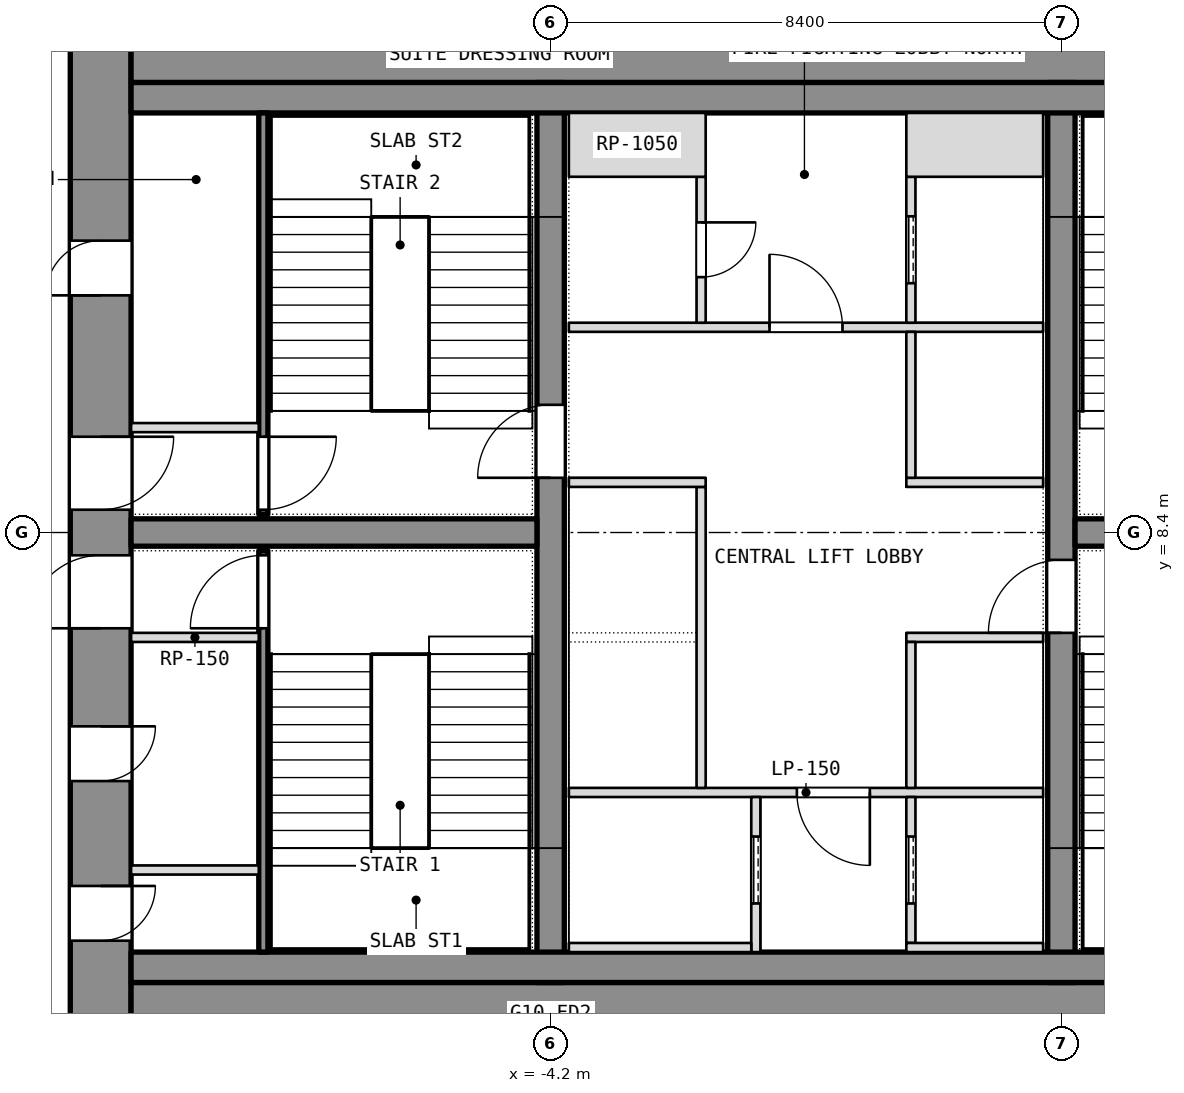
"""IFC4 building model, lengths in metres.
Left out: names, types, materials, properties, quantities, classifications, styles, units other than length and angle.
Written with IfcOpenShell. Run it as: python <this file> out.ifc"""

import sys

from ifc_helpers import new_model, si_unit, direction, frame, frame_2d, origin, place, context, subcontext, project, spatial, rectangle, extrude, element, fill, save


model = new_model("IFC4")
c1 = context("Model", 3, precision=1e-05, world=origin(), true_north=direction((0.0, 1.0)))
c2 = subcontext(c1, "Body", "Model", "MODEL_VIEW")
j1 = project(units=[si_unit("LENGTHUNIT", "METRE"), si_unit("PLANEANGLEUNIT", "RADIAN")], contexts=[c1])
p1 = place(None, origin())
s1 = spatial("IfcSite", under=j1, at=p1, CompositionType="ELEMENT")
p2 = place(p1, origin())
s2 = spatial("IfcBuilding", under=s1, at=p2, CompositionType="ELEMENT")
p3 = place(p2, frame((0.0, 0.0, 126.5)))
s3 = spatial("IfcBuildingStorey", under=s2, at=p3, CompositionType="ELEMENT", Elevation=126.5)
p4 = place(p3, frame((-11.6, 0.0, 0.0), z_axis=(0.0, 0.0, 1.0), x_axis=(0.0, 1.0, 0.0)))
e1 = element("IfcWall", 1, at=p4, inside=s3, PredefinedType="SHEAR", context=c2, shape_type="SweptSolid", body=[
    extrude(rectangle(XDim=16.8, YDim=1.0, at=frame_2d((8.4, 0.0))), origin(), (0.0, 0.0, 1.0), 3.6),
])
p5 = place(p4, frame((1.688, 0.0, 0.0)))
e2 = element("IfcOpeningElement", 2, at=p5, cuts=e1, PredefinedType="OPENING", context=c2, shape_type="SweptSolid", body=[
    extrude(rectangle(XDim=0.9, YDim=2.1, at=frame_2d((0.45, 1.05))), frame((0.0, 0.5, 0.0), z_axis=(0.0, -1.0, 0.0), x_axis=(1.0, 0.0, 0.0)), (0.0, 0.0, 1.0), 1.0),
])
p6 = place(p4, frame((4.312, 0.0, 0.0)))
e3 = element("IfcOpeningElement", 3, at=p6, cuts=e1, PredefinedType="OPENING", context=c2, shape_type="SweptSolid", body=[
    extrude(rectangle(XDim=0.9, YDim=2.1, at=frame_2d((0.45, 1.05))), frame((0.0, 0.5, 0.0), z_axis=(0.0, -1.0, 0.0), x_axis=(1.0, 0.0, 0.0)), (0.0, 0.0, 1.0), 1.0),
])
p7 = place(p4, frame((6.825, 0.0, 0.0)))
e4 = element("IfcOpeningElement", 4, at=p7, cuts=e1, PredefinedType="OPENING", context=c2, shape_type="SweptSolid", body=[
    extrude(rectangle(XDim=1.2, YDim=2.1, at=frame_2d((0.6, 1.05))), frame((0.0, 0.5, 0.0), z_axis=(0.0, -1.0, 0.0), x_axis=(1.0, 0.0, 0.0)), (0.0, 0.0, 1.0), 1.0),
])
p8 = place(p4, frame((12.3, 0.0, 0.0)))
e5 = element("IfcOpeningElement", 5, at=p8, cuts=e1, PredefinedType="OPENING", context=c2, shape_type="SweptSolid", body=[
    extrude(rectangle(XDim=0.9, YDim=2.1, at=frame_2d((0.45, 1.05))), frame((0.0, 0.5, 0.0), z_axis=(0.0, -1.0, 0.0), x_axis=(1.0, 0.0, 0.0)), (0.0, 0.0, 1.0), 1.0),
])
p9 = place(p4, frame((8.775, 0.0, 0.0)))
e6 = element("IfcOpeningElement", 6, at=p9, cuts=e1, PredefinedType="OPENING", context=c2, shape_type="SweptSolid", body=[
    extrude(rectangle(XDim=1.2, YDim=2.1, at=frame_2d((0.6, 1.05))), frame((0.0, 0.5, 0.0), z_axis=(0.0, -1.0, 0.0), x_axis=(1.0, 0.0, 0.0)), (0.0, 0.0, 1.0), 1.0),
])
for number, where, z_axis, x_axis in (
    (7, (-11.1, 0.5, 0.0), (0.0, 0.0, 1.0), (1.0, 0.0, 0.0)),
    (8, (-11.1, 16.3, 0.0), (0.0, 0.0, 1.0), (1.0, 0.0, 0.0)),
):
    element("IfcWall", number, at=place(p3, frame(where, z_axis=z_axis, x_axis=x_axis)), inside=s3, PredefinedType="SHEAR", context=c2, shape_type="SweptSolid", body=[
        extrude(rectangle(XDim=22.2, YDim=1.0, at=frame_2d((11.1, 0.0))), origin(), (0.0, 0.0, 1.0), 3.6),
    ])
p10 = place(p3, frame((-4.2, 1.0, 0.0), z_axis=(0.0, 0.0, 1.0), x_axis=(0.0, 1.0, 0.0)))
e9 = element("IfcWall", 9, at=p10, inside=s3, PredefinedType="SHEAR", context=c2, shape_type="SweptSolid", body=[
    extrude(rectangle(XDim=14.8, YDim=0.45, at=frame_2d((7.4, 0.0))), origin(), (0.0, 0.0, 1.0), 3.6),
])
p11 = place(p10, frame((8.3, 0.0, 0.0)))
e10 = element("IfcOpeningElement", 10, at=p11, cuts=e9, PredefinedType="OPENING", context=c2, shape_type="SweptSolid", body=[
    extrude(rectangle(XDim=1.2, YDim=2.1, at=frame_2d((0.6, 1.05))), frame((0.0, 0.225, 0.0), z_axis=(0.0, -1.0, 0.0), x_axis=(1.0, 0.0, 0.0)), (0.0, 0.0, 1.0), 0.45),
])
p12 = place(p3, frame((4.2, 1.0, 0.0), z_axis=(0.0, 0.0, 1.0), x_axis=(0.0, 1.0, 0.0)))
e11 = element("IfcWall", 11, at=p12, inside=s3, PredefinedType="SHEAR", context=c2, shape_type="SweptSolid", body=[
    extrude(rectangle(XDim=14.8, YDim=0.45, at=frame_2d((7.4, 0.0))), origin(), (0.0, 0.0, 1.0), 3.6),
])
p13 = place(p12, frame((5.75, 0.0, 0.0)))
e12 = element("IfcOpeningElement", 12, at=p13, cuts=e11, PredefinedType="OPENING", context=c2, shape_type="SweptSolid", body=[
    extrude(rectangle(XDim=1.2, YDim=2.1, at=frame_2d((0.6, 1.05))), frame((0.0, 0.225, 0.0), z_axis=(0.0, -1.0, 0.0), x_axis=(1.0, 0.0, 0.0)), (0.0, 0.0, 1.0), 0.45),
])
for number, where, z_axis, x_axis in (
    (13, (-11.1, 8.4, 0.0), (0.0, 0.0, 1.0), (1.0, 0.0, 0.0)),
    (14, (4.425, 8.4, 0.0), (0.0, 0.0, 1.0), (1.0, 0.0, 0.0)),
):
    element("IfcWall", number, at=place(p3, frame(where, z_axis=z_axis, x_axis=x_axis)), inside=s3, PredefinedType="SHEAR", context=c2, shape_type="SweptSolid", body=[
        extrude(rectangle(XDim=6.675, YDim=0.45, at=frame_2d((3.337, 0.0))), origin(), (0.0, 0.0, 1.0), 3.6),
    ])
for number, where, z_axis, x_axis in (
    (15, (-11.1, 1.25, 0.0), (0.0, 0.0, 1.0), (1.0, 0.0, 0.0)),
    (16, (-11.1, 15.55, 0.0), (0.0, 0.0, 1.0), (1.0, 0.0, 0.0)),
):
    element("IfcWall", number, at=place(p3, frame(where, z_axis=z_axis, x_axis=x_axis)), inside=s3, PredefinedType="PARTITIONING", context=c2, shape_type="SweptSolid", body=[
        extrude(rectangle(XDim=22.2, YDim=0.5, at=frame_2d((11.1, 0.0))), origin(), (0.0, 0.0, 1.0), 3.34),
    ])
p14 = place(p3, frame((-8.925, 1.5, 0.0), z_axis=(0.0, 0.0, 1.0), x_axis=(0.0, 1.0, 0.0)))
e17 = element("IfcWall", 17, at=p14, inside=s3, PredefinedType="SHEAR", context=c2, shape_type="SweptSolid", body=[
    extrude(rectangle(XDim=6.6, YDim=0.15, at=frame_2d((3.3, 0.0))), origin(), (0.0, 0.0, 1.0), 3.34),
])
p15 = place(p14, frame((5.325, 0.0, 0.0)))
e18 = element("IfcOpeningElement", 18, at=p15, cuts=e17, PredefinedType="OPENING", context=c2, shape_type="SweptSolid", body=[
    extrude(rectangle(XDim=1.2, YDim=2.1, at=frame_2d((0.6, 1.05))), frame((0.0, 0.075, 0.0), z_axis=(0.0, -1.0, 0.0), x_axis=(1.0, 0.0, 0.0)), (0.0, 0.0, 1.0), 0.15),
])
for number, where, z_axis, x_axis in (
    (19, (-11.1, 6.675, 0.0), (0.0, 0.0, 1.0), (1.0, 0.0, 0.0)),
    (20, (-11.1, 2.85, 0.0), (0.0, 0.0, 1.0), (1.0, 0.0, 0.0)),
):
    element("IfcWall", number, at=place(p3, frame(where, z_axis=z_axis, x_axis=x_axis)), inside=s3, PredefinedType="PARTITIONING", context=c2, shape_type="SweptSolid", body=[
        extrude(rectangle(XDim=2.1, YDim=0.15, at=frame_2d((1.05, 0.0))), origin(), (0.0, 0.0, 1.0), 3.34),
    ])
p16 = place(p3, frame((-8.925, 8.7, 0.0), z_axis=(0.0, 0.0, 1.0), x_axis=(0.0, 1.0, 0.0)))
e21 = element("IfcWall", 21, at=p16, inside=s3, PredefinedType="SHEAR", context=c2, shape_type="SweptSolid", body=[
    extrude(rectangle(XDim=6.6, YDim=0.15, at=frame_2d((3.3, 0.0))), origin(), (0.0, 0.0, 1.0), 3.34),
])
p17 = place(p16, frame((0.075, 0.0, 0.0)))
e22 = element("IfcOpeningElement", 22, at=p17, cuts=e21, PredefinedType="OPENING", context=c2, shape_type="SweptSolid", body=[
    extrude(rectangle(XDim=1.2, YDim=2.1, at=frame_2d((0.6, 1.05))), frame((0.0, 0.075, 0.0), z_axis=(0.0, -1.0, 0.0), x_axis=(1.0, 0.0, 0.0)), (0.0, 0.0, 1.0), 0.15),
])
p18 = place(p3, frame((-11.1, 10.125, 0.0), z_axis=(0.0, 0.0, 1.0), x_axis=(1.0, 0.0, 0.0)))
e23 = element("IfcWall", 23, at=p18, inside=s3, PredefinedType="PARTITIONING", context=c2, shape_type="SweptSolid", body=[
    extrude(rectangle(XDim=2.1, YDim=0.15, at=frame_2d((1.05, 0.0))), origin(), (0.0, 0.0, 1.0), 3.34),
])
p19 = place(p3, frame((-3.9, 4.125, 0.0), z_axis=(0.0, 0.0, 1.0), x_axis=(1.0, 0.0, 0.0)))
e24 = element("IfcWall", 24, at=p19, inside=s3, PredefinedType="PARTITIONING", context=c2, shape_type="SweptSolid", body=[
    extrude(rectangle(XDim=7.8, YDim=0.15, at=frame_2d((3.9, 0.0))), origin(), (0.0, 0.0, 1.0), 3.34),
])
p20 = place(p19, frame((3.75, 0.0, 0.0)))
e25 = element("IfcOpeningElement", 25, at=p20, cuts=e24, PredefinedType="OPENING", context=c2, shape_type="SweptSolid", body=[
    extrude(rectangle(XDim=1.2, YDim=2.1, at=frame_2d((0.6, 1.05))), frame((0.0, 0.075, 0.0), z_axis=(0.0, -1.0, 0.0), x_axis=(1.0, 0.0, 0.0)), (0.0, 0.0, 1.0), 0.15),
])
p21 = place(p3, frame((-3.9, 11.775, 0.0), z_axis=(0.0, 0.0, 1.0), x_axis=(1.0, 0.0, 0.0)))
e26 = element("IfcWall", 26, at=p21, inside=s3, PredefinedType="PARTITIONING", context=c2, shape_type="SweptSolid", body=[
    extrude(rectangle(XDim=7.8, YDim=0.15, at=frame_2d((3.9, 0.0))), origin(), (0.0, 0.0, 1.0), 3.34),
])
p22 = place(p21, frame((3.3, 0.0, 0.0)))
e27 = element("IfcOpeningElement", 27, at=p22, cuts=e26, PredefinedType="OPENING", context=c2, shape_type="SweptSolid", body=[
    extrude(rectangle(XDim=1.2, YDim=2.1, at=frame_2d((0.6, 1.05))), frame((0.0, 0.075, 0.0), z_axis=(0.0, -1.0, 0.0), x_axis=(1.0, 0.0, 0.0)), (0.0, 0.0, 1.0), 0.15),
])
p23 = place(p3, frame((-0.825, 1.5, 0.0), z_axis=(0.0, 0.0, 1.0), x_axis=(0.0, 1.0, 0.0)))
e28 = element("IfcWall", 28, at=p23, inside=s3, PredefinedType="SHEAR", context=c2, shape_type="SweptSolid", body=[
    extrude(rectangle(XDim=2.55, YDim=0.15, at=frame_2d((1.275, 0.0))), origin(), (0.0, 0.0, 1.0), 3.6),
])
p24 = place(p23, frame((0.8, 0.0, 0.0)))
e29 = element("IfcOpeningElement", 29, at=p24, cuts=e28, PredefinedType="OPENING", context=c2, shape_type="SweptSolid", body=[
    extrude(rectangle(XDim=1.1, YDim=2.1, at=frame_2d((0.55, 1.05))), frame((0.0, 0.075, 0.0), z_axis=(0.0, -1.0, 0.0), x_axis=(1.0, 0.0, 0.0)), (0.0, 0.0, 1.0), 0.15),
])
p25 = place(p3, frame((-3.9, 1.575, 0.0), z_axis=(0.0, 0.0, 1.0), x_axis=(1.0, 0.0, 0.0)))
e30 = element("IfcWall", 30, at=p25, inside=s3, PredefinedType="SHEAR", context=c2, shape_type="SweptSolid", body=[
    extrude(rectangle(XDim=3.0, YDim=0.15, at=frame_2d((1.5, 0.0))), origin(), (0.0, 0.0, 1.0), 3.6),
])
p26 = place(p3, frame((-1.725, 4.2, 0.0), z_axis=(0.0, 0.0, 1.0), x_axis=(0.0, 1.0, 0.0)))
e31 = element("IfcWall", 31, at=p26, inside=s3, PredefinedType="SHEAR", context=c2, shape_type="SweptSolid", body=[
    extrude(rectangle(XDim=4.95, YDim=0.15, at=frame_2d((2.475, 0.0))), origin(), (0.0, 0.0, 1.0), 3.6),
])
p27 = place(p3, frame((-3.9, 9.225, 0.0), z_axis=(0.0, 0.0, 1.0), x_axis=(1.0, 0.0, 0.0)))
e32 = element("IfcWall", 32, at=p27, inside=s3, PredefinedType="SHEAR", context=c2, shape_type="SweptSolid", body=[
    extrude(rectangle(XDim=2.25, YDim=0.15, at=frame_2d((1.125, 0.0))), origin(), (0.0, 0.0, 1.0), 3.6),
])
p28 = place(p3, frame((-1.725, 11.85, 0.0), z_axis=(0.0, 0.0, 1.0), x_axis=(0.0, 1.0, 0.0)))
e33 = element("IfcWall", 33, at=p28, inside=s3, PredefinedType="PARTITIONING", context=c2, shape_type="SweptSolid", body=[
    extrude(rectangle(XDim=2.4, YDim=0.15, at=frame_2d((1.2, 0.0))), origin(), (0.0, 0.0, 1.0), 3.34),
])
p29 = place(p28, frame((0.75, 0.0, 0.0)))
e34 = element("IfcOpeningElement", 34, at=p29, cuts=e33, PredefinedType="OPENING", context=c2, shape_type="SweptSolid", body=[
    extrude(rectangle(XDim=0.9, YDim=2.1, at=frame_2d((0.45, 1.05))), frame((0.0, 0.075, 0.0), z_axis=(0.0, -1.0, 0.0), x_axis=(1.0, 0.0, 0.0)), (0.0, 0.0, 1.0), 0.15),
])
p30 = place(p3, frame((-3.9, 14.775, 0.0), z_axis=(0.0, 0.0, 1.0), x_axis=(1.0, 0.0, 0.0)))
e35 = element("IfcWall", 35, at=p30, inside=s3, PredefinedType="PARTITIONING", context=c2, shape_type="SweptSolid", body=[
    extrude(rectangle(XDim=2.25, YDim=1.05, at=frame_2d((1.125, 0.0))), origin(), (0.0, 0.0, 1.0), 3.34),
])
p31 = place(p3, frame((1.725, 1.65, 0.0), z_axis=(0.0, 0.0, 1.0), x_axis=(0.0, 1.0, 0.0)))
e36 = element("IfcWall", 36, at=p31, inside=s3, PredefinedType="SHEAR", context=c2, shape_type="SweptSolid", body=[
    extrude(rectangle(XDim=2.4, YDim=0.15, at=frame_2d((1.2, 0.0))), origin(), (0.0, 0.0, 1.0), 3.6),
])
p32 = place(p31, frame((0.65, 0.0, 0.0)))
e37 = element("IfcOpeningElement", 37, at=p32, cuts=e36, PredefinedType="OPENING", context=c2, shape_type="SweptSolid", body=[
    extrude(rectangle(XDim=1.1, YDim=2.1, at=frame_2d((0.55, 1.05))), frame((0.0, 0.075, 0.0), z_axis=(0.0, -1.0, 0.0), x_axis=(1.0, 0.0, 0.0)), (0.0, 0.0, 1.0), 0.15),
])
p33 = place(p3, frame((1.65, 1.575, 0.0), z_axis=(0.0, 0.0, 1.0), x_axis=(1.0, 0.0, 0.0)))
e38 = element("IfcWall", 38, at=p33, inside=s3, PredefinedType="SHEAR", context=c2, shape_type="SweptSolid", body=[
    extrude(rectangle(XDim=2.25, YDim=0.15, at=frame_2d((1.125, 0.0))), origin(), (0.0, 0.0, 1.0), 3.6),
])
p34 = place(p3, frame((1.725, 11.85, 0.0), z_axis=(0.0, 0.0, 1.0), x_axis=(0.0, 1.0, 0.0)))
e39 = element("IfcWall", 39, at=p34, inside=s3, PredefinedType="SHEAR", context=c2, shape_type="SweptSolid", body=[
    extrude(rectangle(XDim=2.4, YDim=0.15, at=frame_2d((1.2, 0.0))), origin(), (0.0, 0.0, 1.0), 3.6),
])
p35 = place(p34, frame((0.65, 0.0, 0.0)))
e40 = element("IfcOpeningElement", 40, at=p35, cuts=e39, PredefinedType="OPENING", context=c2, shape_type="SweptSolid", body=[
    extrude(rectangle(XDim=1.1, YDim=2.1, at=frame_2d((0.55, 1.05))), frame((0.0, 0.075, 0.0), z_axis=(0.0, -1.0, 0.0), x_axis=(1.0, 0.0, 0.0)), (0.0, 0.0, 1.0), 0.15),
])
p36 = place(p3, frame((1.65, 14.775, 0.0), z_axis=(0.0, 0.0, 1.0), x_axis=(1.0, 0.0, 0.0)))
e41 = element("IfcWall", 41, at=p36, inside=s3, PredefinedType="SHEAR", context=c2, shape_type="SweptSolid", body=[
    extrude(rectangle(XDim=2.25, YDim=1.05, at=frame_2d((1.125, 0.0))), origin(), (0.0, 0.0, 1.0), 3.6),
])
for number, where, z_axis, x_axis in (
    (42, (1.65, 6.675, 0.0), (0.0, 0.0, 1.0), (1.0, 0.0, 0.0)),
    (43, (1.65, 9.225, 0.0), (0.0, 0.0, 1.0), (1.0, 0.0, 0.0)),
):
    element("IfcWall", number, at=place(p3, frame(where, z_axis=z_axis, x_axis=x_axis)), inside=s3, PredefinedType="SHEAR", context=c2, shape_type="SweptSolid", body=[
        extrude(rectangle(XDim=2.25, YDim=0.15, at=frame_2d((1.125, 0.0))), origin(), (0.0, 0.0, 1.0), 3.6),
    ])
p37 = place(p3, frame((1.725, 4.2, 0.0), z_axis=(0.0, 0.0, 1.0), x_axis=(0.0, 1.0, 0.0)))
e44 = element("IfcWall", 44, at=p37, inside=s3, PredefinedType="SHEAR", context=c2, shape_type="SweptSolid", body=[
    extrude(rectangle(XDim=2.4, YDim=0.15, at=frame_2d((1.2, 0.0))), origin(), (0.0, 0.0, 1.0), 3.6),
])
p38 = place(p3, frame((1.725, 9.3, 0.0), z_axis=(0.0, 0.0, 1.0), x_axis=(0.0, 1.0, 0.0)))
e45 = element("IfcWall", 45, at=p38, inside=s3, PredefinedType="SHEAR", context=c2, shape_type="SweptSolid", body=[
    extrude(rectangle(XDim=2.4, YDim=0.15, at=frame_2d((1.2, 0.0))), origin(), (0.0, 0.0, 1.0), 3.6),
])
p39 = place(p5, origin())
e46 = element("IfcDoor", 46, at=p39, inside=s3, OperationType="SINGLE_SWING_LEFT", PredefinedType="DOOR", context=c2, shape_type="SweptSolid", body=[
    extrude(rectangle(XDim=0.9, YDim=2.1, at=frame_2d((0.45, 1.05))), frame((0.0, 0.025, 0.0), z_axis=(0.0, -1.0, 0.0), x_axis=(1.0, 0.0, 0.0)), (0.0, 0.0, 1.0), 0.05),
])
fill(e2, e46)
p40 = place(p6, origin())
e47 = element("IfcDoor", 47, at=p40, inside=s3, OperationType="SINGLE_SWING_LEFT", PredefinedType="DOOR", context=c2, shape_type="SweptSolid", body=[
    extrude(rectangle(XDim=0.9, YDim=2.1, at=frame_2d((0.45, 1.05))), frame((0.0, 0.025, 0.0), z_axis=(0.0, -1.0, 0.0), x_axis=(1.0, 0.0, 0.0)), (0.0, 0.0, 1.0), 0.05),
])
fill(e3, e47)
p41 = place(p7, origin())
e48 = element("IfcDoor", 48, at=p41, inside=s3, OperationType="SINGLE_SWING_LEFT", PredefinedType="DOOR", context=c2, shape_type="SweptSolid", body=[
    extrude(rectangle(XDim=1.2, YDim=2.1, at=frame_2d((0.6, 1.05))), frame((0.0, 0.025, 0.0), z_axis=(0.0, -1.0, 0.0), x_axis=(1.0, 0.0, 0.0)), (0.0, 0.0, 1.0), 0.05),
])
fill(e4, e48)
p42 = place(p15, origin())
e49 = element("IfcDoor", 49, at=p42, inside=s3, OperationType="SINGLE_SWING_LEFT", PredefinedType="DOOR", context=c2, shape_type="SweptSolid", body=[
    extrude(rectangle(XDim=1.2, YDim=2.1, at=frame_2d((0.6, 1.05))), frame((0.0, 0.025, 0.0), z_axis=(0.0, -1.0, 0.0), x_axis=(1.0, 0.0, 0.0)), (0.0, 0.0, 1.0), 0.05),
])
fill(e18, e49)
p43 = place(p8, origin())
e50 = element("IfcDoor", 50, at=p43, inside=s3, OperationType="SINGLE_SWING_LEFT", PredefinedType="DOOR", context=c2, shape_type="SweptSolid", body=[
    extrude(rectangle(XDim=0.9, YDim=2.1, at=frame_2d((0.45, 1.05))), frame((0.0, 0.025, 0.0), z_axis=(0.0, -1.0, 0.0), x_axis=(1.0, 0.0, 0.0)), (0.0, 0.0, 1.0), 0.05),
])
fill(e5, e50)
p44 = place(p9, origin())
e51 = element("IfcDoor", 51, at=p44, inside=s3, OperationType="SINGLE_SWING_LEFT", PredefinedType="DOOR", context=c2, shape_type="SweptSolid", body=[
    extrude(rectangle(XDim=1.2, YDim=2.1, at=frame_2d((0.6, 1.05))), frame((0.0, 0.025, 0.0), z_axis=(0.0, -1.0, 0.0), x_axis=(1.0, 0.0, 0.0)), (0.0, 0.0, 1.0), 0.05),
])
fill(e6, e51)
p45 = place(p17, origin())
e52 = element("IfcDoor", 52, at=p45, inside=s3, OperationType="SINGLE_SWING_LEFT", PredefinedType="DOOR", context=c2, shape_type="SweptSolid", body=[
    extrude(rectangle(XDim=1.2, YDim=2.1, at=frame_2d((0.6, 1.05))), frame((0.0, 0.025, 0.0), z_axis=(0.0, -1.0, 0.0), x_axis=(1.0, 0.0, 0.0)), (0.0, 0.0, 1.0), 0.05),
])
fill(e22, e52)
p46 = place(p24, origin())
e53 = element("IfcDoor", 53, at=p46, inside=s3, OperationType="SLIDING_TO_LEFT", PredefinedType="DOOR", context=c2, shape_type="SweptSolid", body=[
    extrude(rectangle(XDim=1.1, YDim=2.1, at=frame_2d((0.55, 1.05))), frame((0.0, 0.025, 0.0), z_axis=(0.0, -1.0, 0.0), x_axis=(1.0, 0.0, 0.0)), (0.0, 0.0, 1.0), 0.05),
])
fill(e29, e53)
p47 = place(p32, origin())
e54 = element("IfcDoor", 54, at=p47, inside=s3, OperationType="SLIDING_TO_LEFT", PredefinedType="DOOR", context=c2, shape_type="SweptSolid", body=[
    extrude(rectangle(XDim=1.1, YDim=2.1, at=frame_2d((0.55, 1.05))), frame((0.0, 0.025, 0.0), z_axis=(0.0, -1.0, 0.0), x_axis=(1.0, 0.0, 0.0)), (0.0, 0.0, 1.0), 0.05),
])
fill(e37, e54)
p48 = place(p35, origin())
e55 = element("IfcDoor", 55, at=p48, inside=s3, OperationType="SLIDING_TO_LEFT", PredefinedType="DOOR", context=c2, shape_type="SweptSolid", body=[
    extrude(rectangle(XDim=1.1, YDim=2.1, at=frame_2d((0.55, 1.05))), frame((0.0, 0.025, 0.0), z_axis=(0.0, -1.0, 0.0), x_axis=(1.0, 0.0, 0.0)), (0.0, 0.0, 1.0), 0.05),
])
fill(e40, e55)
p49 = place(p20, origin())
e56 = element("IfcDoor", 56, at=p49, inside=s3, OperationType="SINGLE_SWING_LEFT", PredefinedType="DOOR", context=c2, shape_type="SweptSolid", body=[
    extrude(rectangle(XDim=1.2, YDim=2.1, at=frame_2d((0.6, 1.05))), frame((0.0, 0.025, 0.0), z_axis=(0.0, -1.0, 0.0), x_axis=(1.0, 0.0, 0.0)), (0.0, 0.0, 1.0), 0.05),
])
fill(e25, e56)
p50 = place(p22, origin())
e57 = element("IfcDoor", 57, at=p50, inside=s3, OperationType="SINGLE_SWING_LEFT", PredefinedType="DOOR", context=c2, shape_type="SweptSolid", body=[
    extrude(rectangle(XDim=1.2, YDim=2.1, at=frame_2d((0.6, 1.05))), frame((0.0, 0.025, 0.0), z_axis=(0.0, -1.0, 0.0), x_axis=(1.0, 0.0, 0.0)), (0.0, 0.0, 1.0), 0.05),
])
fill(e27, e57)
p51 = place(p29, origin())
e58 = element("IfcDoor", 58, at=p51, inside=s3, OperationType="SINGLE_SWING_LEFT", PredefinedType="DOOR", context=c2, shape_type="SweptSolid", body=[
    extrude(rectangle(XDim=0.9, YDim=2.1, at=frame_2d((0.45, 1.05))), frame((0.0, 0.025, 0.0), z_axis=(0.0, -1.0, 0.0), x_axis=(1.0, 0.0, 0.0)), (0.0, 0.0, 1.0), 0.05),
])
fill(e34, e58)
p52 = place(p11, origin())
e59 = element("IfcDoor", 59, at=p52, inside=s3, OperationType="SINGLE_SWING_LEFT", PredefinedType="DOOR", context=c2, shape_type="SweptSolid", body=[
    extrude(rectangle(XDim=1.2, YDim=2.1, at=frame_2d((0.6, 1.05))), frame((0.0, 0.025, 0.0), z_axis=(0.0, -1.0, 0.0), x_axis=(1.0, 0.0, 0.0)), (0.0, 0.0, 1.0), 0.05),
])
fill(e10, e59)
p53 = place(p13, origin())
e60 = element("IfcDoor", 60, at=p53, inside=s3, OperationType="SINGLE_SWING_LEFT", PredefinedType="DOOR", context=c2, shape_type="SweptSolid", body=[
    extrude(rectangle(XDim=1.2, YDim=2.1, at=frame_2d((0.6, 1.05))), frame((0.0, 0.025, 0.0), z_axis=(0.0, -1.0, 0.0), x_axis=(1.0, 0.0, 0.0)), (0.0, 0.0, 1.0), 0.05),
])
fill(e12, e60)
save(model, sys.argv[1])
